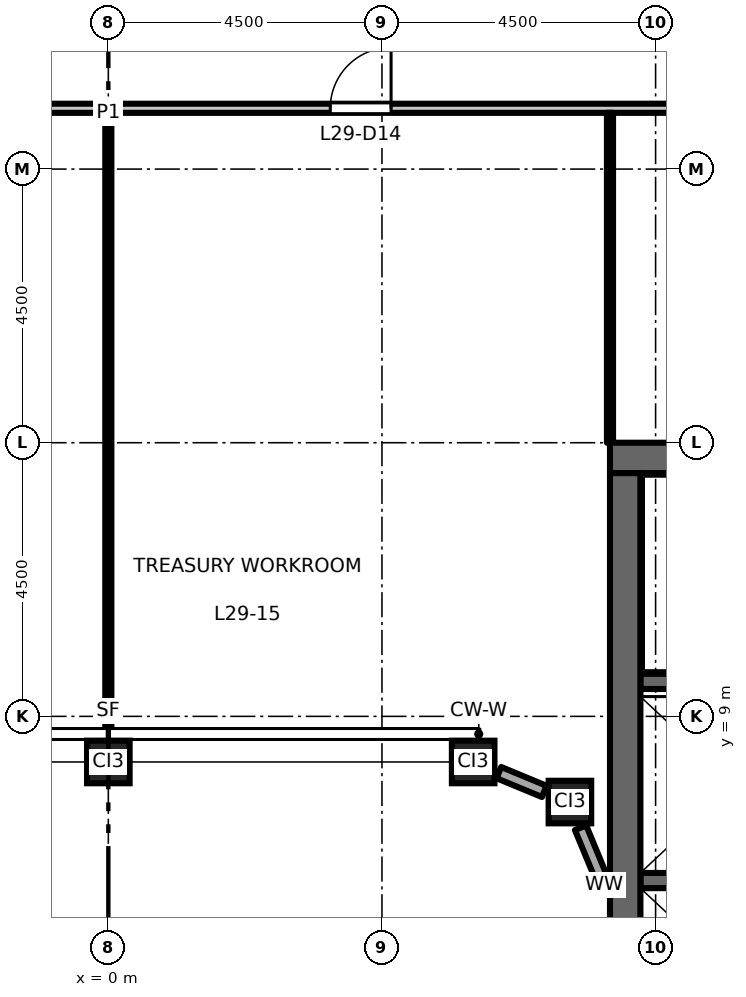
"""IFC4 building model, lengths in metres.
Left out: names, types, materials, properties, quantities, classifications, styles, units other than length and angle.
Written with IfcOpenShell. Run it as: python <this file> out.ifc"""

import sys

from ifc_helpers import new_model, si_unit, direction, frame, frame_2d, origin, origin_2d, place, context, subcontext, project, spatial, rectangle, hollow_rectangle, extrude, element, fill, save


model = new_model("IFC4")
c1 = context("Model", 3, precision=1e-05, world=origin(), true_north=direction((0.0, 1.0)))
c2 = subcontext(c1, "Body", "Model", "MODEL_VIEW")
j1 = project(units=[si_unit("LENGTHUNIT", "METRE"), si_unit("PLANEANGLEUNIT", "RADIAN")], contexts=[c1])
p1 = place(None, origin())
s1 = spatial("IfcSite", under=j1, at=p1, CompositionType="ELEMENT")
p2 = place(p1, origin())
s2 = spatial("IfcBuilding", under=s1, at=p2, CompositionType="ELEMENT")
p3 = place(p2, frame((0.0, 0.0, 136.2)))
s3 = spatial("IfcBuildingStorey", under=s2, at=p3, CompositionType="ELEMENT", Elevation=136.2)
for number, where, z_axis, x_axis in (
    (1, (0.0, 8.25, 0.0), (0.0, 0.0, 1.0), (1.0, 0.0, 0.0)),
    (2, (6.0, 8.25, 0.0), (0.0, 0.0, 1.0), (1.0, 0.0, 0.0)),
    (3, (7.591, 7.591, 0.0), (0.0, 0.0, 1.0), (1.0, 0.0, 0.0)),
):
    element("IfcColumn", number, at=place(p3, frame(where, z_axis=z_axis, x_axis=x_axis)), inside=s3, PredefinedType="COLUMN", context=c2, shape_type="SweptSolid", body=[
        extrude(hollow_rectangle(XDim=0.7, YDim=0.7, WallThickness=0.04, at=origin_2d()), origin(), (0.0, 0.0, 1.0), 4.5),
    ])
p4 = place(p3, frame((8.75, 6.3, 0.0), z_axis=(0.0, 0.0, 1.0), x_axis=(1.0, 0.0, 0.0)))
e4 = element("IfcWall", 4, at=p4, inside=s3, PredefinedType="SHEAR", context=c2, shape_type="SweptSolid", body=[
    extrude(rectangle(XDim=3.1, YDim=0.25, at=frame_2d((1.55, 0.0))), origin(), (0.0, 0.0, 1.0), 4.35),
])
p5 = place(p3, frame((8.75, 9.575, 0.0), z_axis=(0.0, 0.0, 1.0), x_axis=(1.0, 0.0, 0.0)))
e5 = element("IfcWall", 5, at=p5, inside=s3, PredefinedType="SHEAR", context=c2, shape_type="SweptSolid", body=[
    extrude(rectangle(XDim=8.0, YDim=0.25, at=frame_2d((4.0, 0.0))), origin(), (0.0, 0.0, 1.0), 4.35),
])
p6 = place(p5, frame((6.65, 0.0, 0.0)))
e6 = element("IfcOpeningElement", 6, at=p6, cuts=e5, PredefinedType="OPENING", context=c2, shape_type="SweptSolid", body=[
    extrude(rectangle(XDim=1.1, YDim=2.1, at=frame_2d((0.55, 1.05))), frame((0.0, 0.135, 0.0), z_axis=(0.0, -1.0, 0.0), x_axis=(1.0, 0.0, 0.0)), (0.0, 0.0, 1.0), 0.27),
])
p7 = place(p3, frame((8.25, 13.25, 0.0), z_axis=(0.0, 0.0, 1.0), x_axis=(1.0, 0.0, 0.0)))
e7 = element("IfcWall", 7, at=p7, inside=s3, PredefinedType="SHEAR", context=c2, shape_type="SweptSolid", body=[
    extrude(rectangle(XDim=13.5, YDim=0.5, at=frame_2d((6.75, 0.0))), origin(), (0.0, 0.0, 1.0), 4.35),
])
p8 = place(p3, frame((8.5, -13.0, 0.0), z_axis=(0.0, 0.0, 1.0), x_axis=(0.0, 1.0, 0.0)))
e8 = element("IfcWall", 8, at=p8, inside=s3, PredefinedType="SHEAR", context=c2, shape_type="SweptSolid", body=[
    extrude(rectangle(XDim=26.0, YDim=0.5, at=frame_2d((13.0, 0.0))), origin(), (0.0, 0.0, 1.0), 4.35),
])
p9 = place(p3, frame((8.154, 6.231, 0.0), z_axis=(0.0, 0.0, 1.0), x_axis=(-0.382769662028, 0.923843810301, 0.0)))
e9 = element("IfcWall", 9, at=p9, inside=s3, PredefinedType="STANDARD", context=c2, shape_type="SweptSolid", body=[
    extrude(rectangle(XDim=1.015, YDim=0.2, at=frame_2d((0.507, 0.0))), origin(), (0.0, 0.0, 1.0), 3.826),
])
p10 = place(p3, frame((7.168, 7.766, 0.0), z_axis=(0.0, 0.0, 1.0), x_axis=(-0.923817771127, 0.382832503518, 0.0)))
e10 = element("IfcWall", 10, at=p10, inside=s3, PredefinedType="STANDARD", context=c2, shape_type="SweptSolid", body=[
    extrude(rectangle(XDim=0.807, YDim=0.2, at=frame_2d((0.404, 0.0))), origin(), (0.0, 0.0, 1.0), 3.826),
])
p11 = place(p3, frame((-21.825, 19.0, 0.0), z_axis=(0.0, 0.0, 1.0), x_axis=(1.0, 0.0, 0.0)))
e11 = element("IfcWall", 11, at=p11, inside=s3, PredefinedType="PARTITIONING", context=c2, shape_type="SweptSolid", body=[
    extrude(rectangle(XDim=43.65, YDim=0.15, at=frame_2d((21.825, 0.0))), origin(), (0.0, 0.0, 1.0), 4.35),
])
p12 = place(p11, frame((17.225, 0.0, 0.0)))
e12 = element("IfcOpeningElement", 12, at=p12, cuts=e11, PredefinedType="OPENING", context=c2, shape_type="SweptSolid", body=[
    extrude(rectangle(XDim=1.0, YDim=2.1, at=frame_2d((0.5, 1.05))), frame((0.0, 0.085, 0.0), z_axis=(0.0, -1.0, 0.0), x_axis=(1.0, 0.0, 0.0)), (0.0, 0.0, 1.0), 0.17),
])
p13 = place(p11, frame((25.475, 0.0, 0.0)))
e13 = element("IfcOpeningElement", 13, at=p13, cuts=e11, PredefinedType="OPENING", context=c2, shape_type="SweptSolid", body=[
    extrude(rectangle(XDim=1.0, YDim=2.1, at=frame_2d((0.5, 1.05))), frame((0.0, 0.085, 0.0), z_axis=(0.0, -1.0, 0.0), x_axis=(1.0, 0.0, 0.0)), (0.0, 0.0, 1.0), 0.17),
])
p14 = place(p11, frame((6.225, 0.0, 0.0)))
e14 = element("IfcOpeningElement", 14, at=p14, cuts=e11, PredefinedType="OPENING", context=c2, shape_type="SweptSolid", body=[
    extrude(rectangle(XDim=1.0, YDim=2.1, at=frame_2d((0.5, 1.05))), frame((0.0, 0.085, 0.0), z_axis=(0.0, -1.0, 0.0), x_axis=(1.0, 0.0, 0.0)), (0.0, 0.0, 1.0), 0.17),
])
p15 = place(p11, frame((36.225, 0.0, 0.0)))
e15 = element("IfcOpeningElement", 15, at=p15, cuts=e11, PredefinedType="OPENING", context=c2, shape_type="SweptSolid", body=[
    extrude(rectangle(XDim=1.0, YDim=2.1, at=frame_2d((0.5, 1.05))), frame((0.0, 0.085, 0.0), z_axis=(0.0, -1.0, 0.0), x_axis=(1.0, 0.0, 0.0)), (0.0, 0.0, 1.0), 0.17),
])
p16 = place(p3, frame((0.0, 8.65, 0.0), z_axis=(0.0, 0.0, 1.0), x_axis=(0.0, 1.0, 0.0)))
e16 = element("IfcWall", 16, at=p16, inside=s3, PredefinedType="PARTITIONING", context=c2, shape_type="SweptSolid", body=[
    extrude(rectangle(XDim=10.275, YDim=0.1, at=frame_2d((5.138, 0.0))), origin(), (0.0, 0.0, 1.0), 3.45),
])
p17 = place(p3, frame((8.25, 13.5, 0.0), z_axis=(0.0, 0.0, 1.0), x_axis=(0.0, 1.0, 0.0)))
e17 = element("IfcWall", 17, at=p17, inside=s3, PredefinedType="PARTITIONING", context=c2, shape_type="SweptSolid", body=[
    extrude(rectangle(XDim=5.425, YDim=0.1, at=frame_2d((2.712, 0.0))), origin(), (0.0, 0.0, 1.0), 4.35),
])
p18 = place(p13, origin())
e18 = element("IfcDoor", 18, at=p18, inside=s3, OperationType="SINGLE_SWING_RIGHT", PredefinedType="DOOR", context=c2, shape_type="SweptSolid", body=[
    extrude(rectangle(XDim=1.0, YDim=2.1, at=frame_2d((0.5, 1.05))), frame((0.0, 0.025, 0.0), z_axis=(0.0, -1.0, 0.0), x_axis=(1.0, 0.0, 0.0)), (0.0, 0.0, 1.0), 0.05),
])
fill(e13, e18)
save(model, sys.argv[1])
